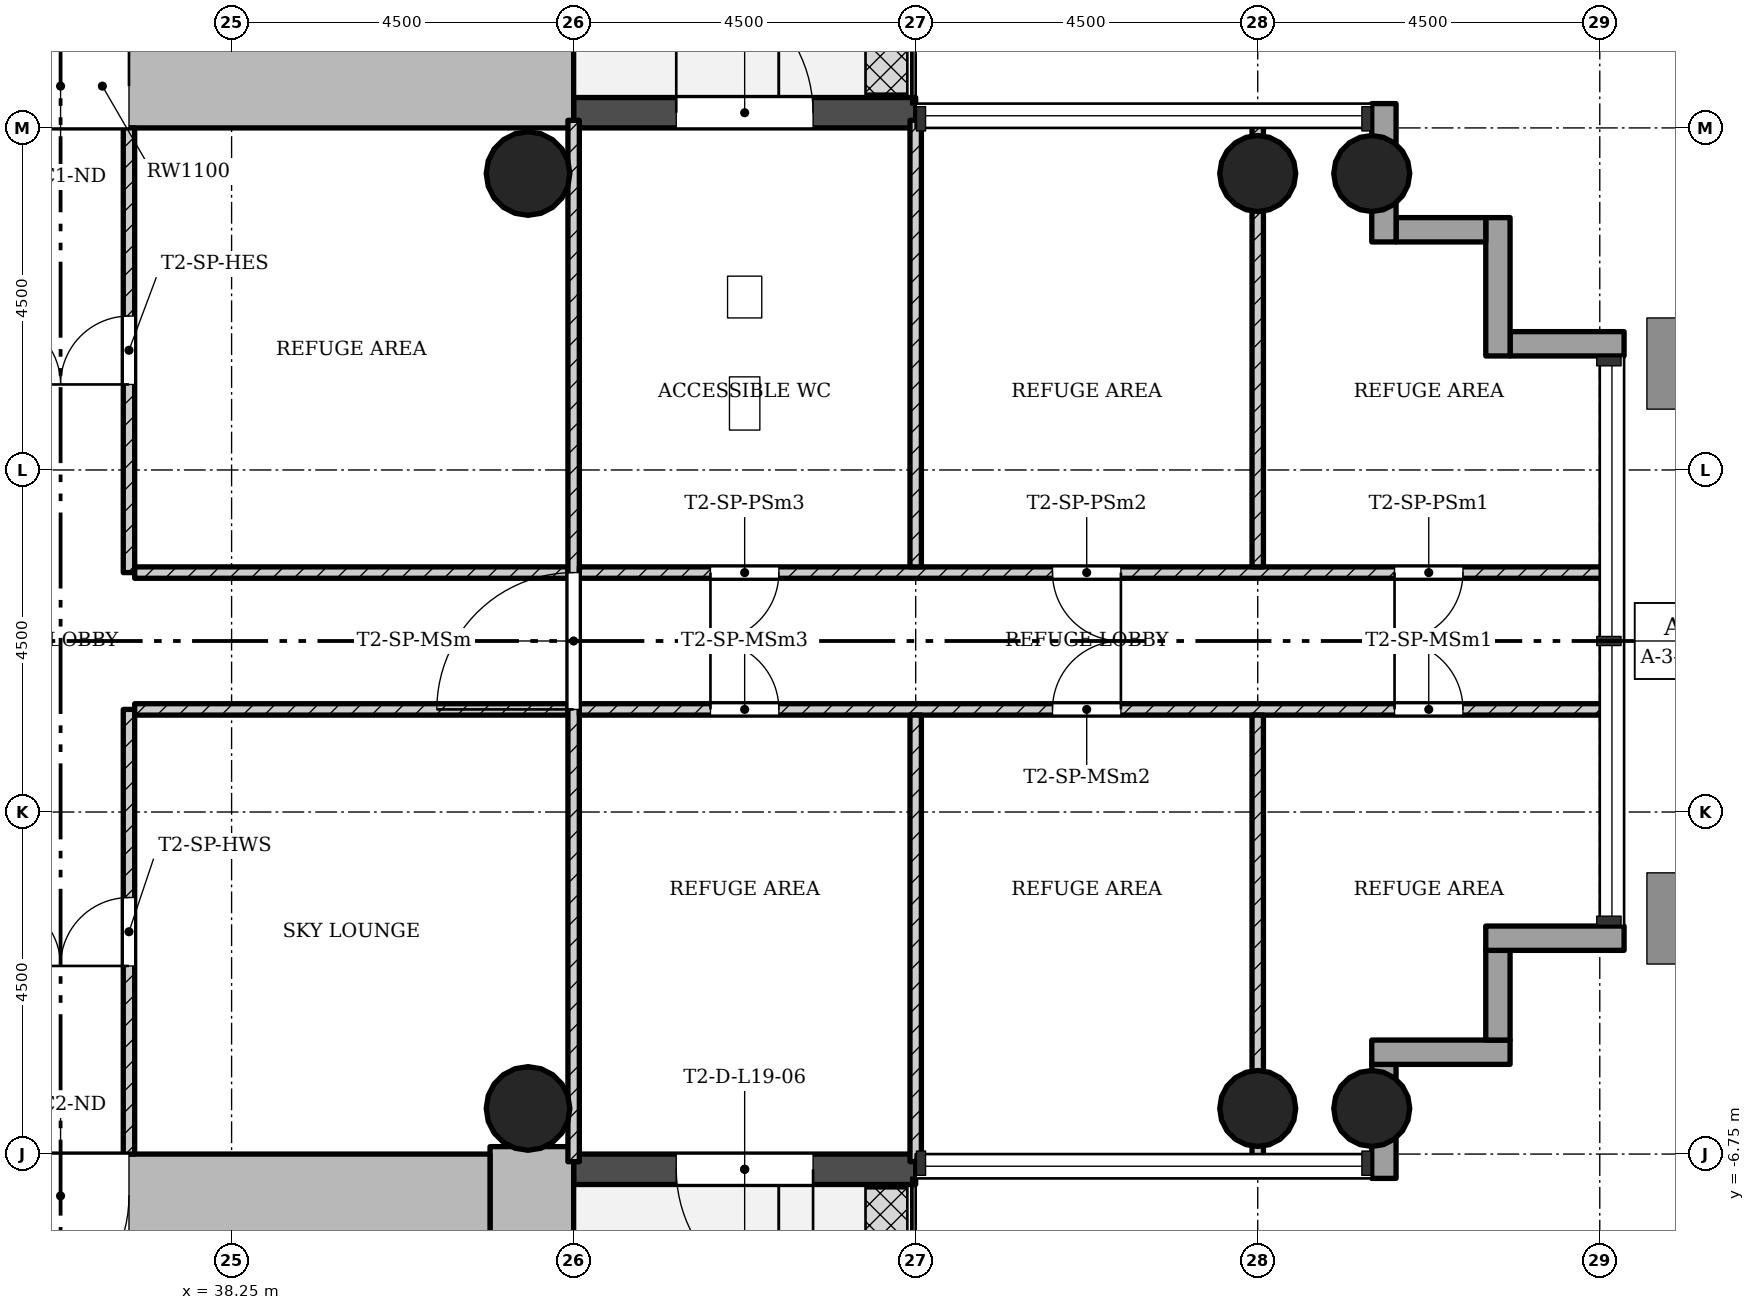
"""IFC4 building model, lengths in metres.
Left out: names, types, materials, properties, quantities, classifications, styles, units other than length and angle.
Written with IfcOpenShell. Run it as: python <this file> out.ifc"""

import sys

from ifc_helpers import new_model, si_unit, direction, frame, frame_2d, origin, origin_2d, place, context, subcontext, project, spatial, rectangle, hollow_circle, extrude, element, fill, save


model = new_model("IFC4")
c1 = context("Model", 3, precision=1e-05, world=origin(), true_north=direction((0.0, 1.0)))
c2 = subcontext(c1, "Body", "Model", "MODEL_VIEW")
j1 = project(units=[si_unit("LENGTHUNIT", "METRE"), si_unit("PLANEANGLEUNIT", "RADIAN")], contexts=[c1])
p1 = place(None, origin())
s1 = spatial("IfcSite", under=j1, at=p1, CompositionType="ELEMENT")
p2 = place(p1, origin())
s2 = spatial("IfcBuilding", under=s1, at=p2, CompositionType="ELEMENT")
p3 = place(p2, frame((0.0, 0.0, 72.1)))
s3 = spatial("IfcBuildingStorey", under=s2, at=p3, CompositionType="ELEMENT", Elevation=72.1)
p4 = place(p3, frame((30.35, 7.3, 0.0), z_axis=(0.0, 0.0, 1.0), x_axis=(1.0, 0.0, 0.0)))
e1 = element("IfcWall", 1, at=p4, inside=s3, PredefinedType="SHEAR", context=c2, shape_type="SweptSolid", body=[
    extrude(rectangle(XDim=12.4, YDim=1.1, at=frame_2d((6.2, 0.0))), origin(), (0.0, 0.0, 1.0), 4.5),
])
p5 = place(p4, frame((4.75, 0.0, 0.0)))
e2 = element("IfcOpeningElement", 2, at=p5, cuts=e1, PredefinedType="OPENING", context=c2, shape_type="SweptSolid", body=[
    extrude(rectangle(XDim=1.8, YDim=2.1, at=frame_2d((0.9, 1.05))), frame((0.0, 0.56, 0.0), z_axis=(0.0, -1.0, 0.0), x_axis=(1.0, 0.0, 0.0)), (0.0, 0.0, 1.0), 1.12),
])
p6 = place(p3, frame((42.2, -15.248, 0.0), z_axis=(0.0, 0.0, 1.0), x_axis=(0.0, 1.0, 0.0)))
e3 = element("IfcWall", 3, at=p6, inside=s3, PredefinedType="SHEAR", context=c2, shape_type="SweptSolid", body=[
    extrude(rectangle(XDim=8.596, YDim=1.1, at=frame_2d((4.298, 0.0))), origin(), (0.0, 0.0, 1.0), 4.5),
])
p7 = place(p3, frame((41.65, -7.3, 0.0), z_axis=(0.0, 0.0, 1.0), x_axis=(-1.0, 0.0, 0.0)))
e4 = element("IfcWall", 4, at=p7, inside=s3, PredefinedType="SHEAR", context=c2, shape_type="SweptSolid", body=[
    extrude(rectangle(XDim=12.4, YDim=1.1, at=frame_2d((6.2, 0.0))), origin(), (0.0, 0.0, 1.0), 4.5),
])
p8 = place(p7, frame((4.75, 0.0, 0.0)))
e5 = element("IfcOpeningElement", 5, at=p8, cuts=e4, PredefinedType="OPENING", context=c2, shape_type="SweptSolid", body=[
    extrude(rectangle(XDim=1.8, YDim=2.1, at=frame_2d((0.9, 1.05))), frame((0.0, 0.56, 0.0), z_axis=(0.0, -1.0, 0.0), x_axis=(1.0, 0.0, 0.0)), (0.0, 0.0, 1.0), 1.12),
])
for number, where, z_axis, x_axis in (
    (6, (51.75, -6.15, 0.0), (0.0, 0.0, 1.0), (1.0, 0.0, 0.0)),
    (7, (51.75, 6.15, 0.0), (0.0, 0.0, 1.0), (1.0, 0.0, 0.0)),
    (8, (53.25, -6.15, 0.0), (0.0, 0.0, 1.0), (1.0, 0.0, 0.0)),
    (9, (53.25, 6.15, 0.0), (0.0, 0.0, 1.0), (1.0, 0.0, 0.0)),
):
    element("IfcColumn", number, at=place(p3, frame(where, z_axis=z_axis, x_axis=x_axis)), inside=s3, PredefinedType="COLUMN", context=c2, shape_type="SweptSolid", body=[
        extrude(hollow_circle(Radius=0.5, WallThickness=0.036, at=origin_2d()), origin(), (0.0, 0.0, 1.0), 4.5),
    ])
for number, where, z_axis, x_axis in (
    (10, (42.15, -6.15, 0.0), (0.0, 0.0, 1.0), (1.0, 0.0, 0.0)),
    (11, (42.15, 6.15, 0.0), (0.0, 0.0, 1.0), (1.0, 0.0, 0.0)),
):
    element("IfcColumn", number, at=place(p3, frame(where, z_axis=z_axis, x_axis=x_axis)), inside=s3, PredefinedType="COLUMN", context=c2, shape_type="SweptSolid", body=[
        extrude(hollow_circle(Radius=0.55, WallThickness=0.04, at=origin_2d()), origin(), (0.0, 0.0, 1.0), 4.5),
    ])
p9 = place(p3, frame((42.75, -6.95, -0.02), z_axis=(0.0, 0.0, 1.0), x_axis=(1.0, 0.0, 0.0)))
e12 = element("IfcWall", 12, at=p9, inside=s3, PredefinedType="STANDARD", context=c2, shape_type="SweptSolid", body=[
    extrude(rectangle(XDim=4.5, YDim=0.4, at=frame_2d((2.25, 0.0))), origin(), (0.0, 0.0, 1.0), 4.22),
])
p10 = place(p9, frame((1.35, 0.0, 0.02)))
e13 = element("IfcOpeningElement", 13, at=p10, cuts=e12, PredefinedType="OPENING", context=c2, shape_type="SweptSolid", body=[
    extrude(rectangle(XDim=1.8, YDim=2.1, at=frame_2d((0.9, 1.05))), frame((0.0, 0.21, 0.0), z_axis=(0.0, -1.0, 0.0), x_axis=(1.0, 0.0, 0.0)), (0.0, 0.0, 1.0), 0.42),
])
p11 = place(p3, frame((53.41, -7.07, -0.3), z_axis=(0.0, 0.0, 1.0), x_axis=(0.0, 1.0, 0.0)))
e14 = element("IfcWall", 14, at=p11, inside=s3, PredefinedType="STANDARD", context=c2, shape_type="SweptSolid", body=[
    extrude(rectangle(XDim=1.5, YDim=0.32, at=frame_2d((0.75, 0.0))), origin(), (0.0, 0.0, 1.0), 4.5),
])
p12 = place(p3, frame((53.25, -5.41, -0.3), z_axis=(0.0, 0.0, 1.0), x_axis=(1.0, 0.0, 0.0)))
e15 = element("IfcWall", 15, at=p12, inside=s3, PredefinedType="STANDARD", context=c2, shape_type="SweptSolid", body=[
    extrude(rectangle(XDim=1.82, YDim=0.32, at=frame_2d((0.91, 0.0))), origin(), (0.0, 0.0, 1.0), 4.5),
])
p13 = place(p3, frame((54.91, -5.25, -0.3), z_axis=(0.0, 0.0, 1.0), x_axis=(0.0, 1.0, 0.0)))
e16 = element("IfcWall", 16, at=p13, inside=s3, PredefinedType="STANDARD", context=c2, shape_type="SweptSolid", body=[
    extrude(rectangle(XDim=1.18, YDim=0.32, at=frame_2d((0.59, 0.0))), origin(), (0.0, 0.0, 1.0), 4.5),
])
p14 = place(p3, frame((54.75, -3.91, -0.3), z_axis=(0.0, 0.0, 1.0), x_axis=(1.0, 0.0, 0.0)))
e17 = element("IfcWall", 17, at=p14, inside=s3, PredefinedType="STANDARD", context=c2, shape_type="SweptSolid", body=[
    extrude(rectangle(XDim=1.82, YDim=0.32, at=frame_2d((0.91, 0.0))), origin(), (0.0, 0.0, 1.0), 4.5),
])
p15 = place(p3, frame((56.57, 3.91, -0.3), z_axis=(0.0, 0.0, 1.0), x_axis=(-1.0, 0.0, 0.0)))
e18 = element("IfcWall", 18, at=p15, inside=s3, PredefinedType="STANDARD", context=c2, shape_type="SweptSolid", body=[
    extrude(rectangle(XDim=1.5, YDim=0.32, at=frame_2d((0.75, 0.0))), origin(), (0.0, 0.0, 1.0), 4.5),
])
p16 = place(p3, frame((54.91, 3.75, -0.3), z_axis=(0.0, 0.0, 1.0), x_axis=(0.0, 1.0, 0.0)))
e19 = element("IfcWall", 19, at=p16, inside=s3, PredefinedType="STANDARD", context=c2, shape_type="SweptSolid", body=[
    extrude(rectangle(XDim=1.82, YDim=0.32, at=frame_2d((0.91, 0.0))), origin(), (0.0, 0.0, 1.0), 4.5),
])
p17 = place(p3, frame((54.75, 5.41, -0.3), z_axis=(0.0, 0.0, 1.0), x_axis=(-1.0, 0.0, 0.0)))
e20 = element("IfcWall", 20, at=p17, inside=s3, PredefinedType="STANDARD", context=c2, shape_type="SweptSolid", body=[
    extrude(rectangle(XDim=1.18, YDim=0.32, at=frame_2d((0.59, 0.0))), origin(), (0.0, 0.0, 1.0), 4.5),
])
p18 = place(p3, frame((53.41, 5.25, -0.3), z_axis=(0.0, 0.0, 1.0), x_axis=(0.0, 1.0, 0.0)))
e21 = element("IfcWall", 21, at=p18, inside=s3, PredefinedType="STANDARD", context=c2, shape_type="SweptSolid", body=[
    extrude(rectangle(XDim=1.82, YDim=0.32, at=frame_2d((0.91, 0.0))), origin(), (0.0, 0.0, 1.0), 4.5),
])
p19 = place(p3, frame((47.25, 6.95, -0.02), z_axis=(0.0, 0.0, 1.0), x_axis=(-1.0, 0.0, 0.0)))
e22 = element("IfcWall", 22, at=p19, inside=s3, PredefinedType="STANDARD", context=c2, shape_type="SweptSolid", body=[
    extrude(rectangle(XDim=4.5, YDim=0.4, at=frame_2d((2.25, 0.0))), origin(), (0.0, 0.0, 1.0), 4.22),
])
p20 = place(p19, frame((1.35, 0.0, 0.02)))
e23 = element("IfcOpeningElement", 23, at=p20, cuts=e22, PredefinedType="OPENING", context=c2, shape_type="SweptSolid", body=[
    extrude(rectangle(XDim=1.8, YDim=2.1, at=frame_2d((0.9, 1.05))), frame((0.0, 0.21, 0.0), z_axis=(0.0, -1.0, 0.0), x_axis=(1.0, 0.0, 0.0)), (0.0, 0.0, 1.0), 0.42),
])
p21 = place(p3, frame((36.9, 0.9, 0.0), z_axis=(0.0, 0.0, 1.0), x_axis=(0.0, 1.0, 0.0)))
e24 = element("IfcWall", 24, at=p21, inside=s3, PredefinedType="PARTITIONING", context=c2, shape_type="SweptSolid", body=[
    extrude(rectangle(XDim=5.85, YDim=0.15, at=frame_2d((2.925, 0.0))), origin(), (0.0, 0.0, 1.0), 4.08),
])
p22 = place(p21, frame((2.475, 0.0, 0.0)))
e25 = element("IfcOpeningElement", 25, at=p22, cuts=e24, PredefinedType="OPENING", context=c2, shape_type="SweptSolid", body=[
    extrude(rectangle(XDim=0.9, YDim=2.1, at=frame_2d((0.45, 1.05))), frame((0.0, 0.085, 0.0), z_axis=(0.0, -1.0, 0.0), x_axis=(1.0, 0.0, 0.0)), (0.0, 0.0, 1.0), 0.17),
])
p23 = place(p3, frame((42.675, 0.9, 0.0), z_axis=(0.0, 0.0, 1.0), x_axis=(-1.0, 0.0, 0.0)))
e26 = element("IfcWall", 26, at=p23, inside=s3, PredefinedType="PARTITIONING", context=c2, shape_type="SweptSolid", body=[
    extrude(rectangle(XDim=5.7, YDim=0.15, at=frame_2d((2.85, 0.0))), origin(), (0.0, 0.0, 1.0), 4.08),
])
p24 = place(p3, frame((36.9, -6.75, 0.0), z_axis=(0.0, 0.0, 1.0), x_axis=(0.0, 1.0, 0.0)))
e27 = element("IfcWall", 27, at=p24, inside=s3, PredefinedType="PARTITIONING", context=c2, shape_type="SweptSolid", body=[
    extrude(rectangle(XDim=5.85, YDim=0.15, at=frame_2d((2.925, 0.0))), origin(), (0.0, 0.0, 1.0), 4.08),
])
p25 = place(p24, frame((2.475, 0.0, 0.0)))
e28 = element("IfcOpeningElement", 28, at=p25, cuts=e27, PredefinedType="OPENING", context=c2, shape_type="SweptSolid", body=[
    extrude(rectangle(XDim=0.9, YDim=2.1, at=frame_2d((0.45, 1.05))), frame((0.0, 0.085, 0.0), z_axis=(0.0, -1.0, 0.0), x_axis=(1.0, 0.0, 0.0)), (0.0, 0.0, 1.0), 0.17),
])
p26 = place(p3, frame((42.675, -0.9, 0.0), z_axis=(0.0, 0.0, 1.0), x_axis=(-1.0, 0.0, 0.0)))
e29 = element("IfcWall", 29, at=p26, inside=s3, PredefinedType="PARTITIONING", context=c2, shape_type="SweptSolid", body=[
    extrude(rectangle(XDim=5.7, YDim=0.15, at=frame_2d((2.85, 0.0))), origin(), (0.0, 0.0, 1.0), 4.08),
])
p27 = place(p3, frame((42.75, -6.85, 0.0), z_axis=(0.0, 0.0, 1.0), x_axis=(0.0, 1.0, 0.0)))
e30 = element("IfcWall", 30, at=p27, inside=s3, PredefinedType="PARTITIONING", context=c2, shape_type="SweptSolid", body=[
    extrude(rectangle(XDim=13.7, YDim=0.15, at=frame_2d((6.85, 0.0))), origin(), (0.0, 0.0, 1.0), 4.08),
])
p28 = place(p27, frame((5.95, 0.0, 0.0)))
e31 = element("IfcOpeningElement", 31, at=p28, cuts=e30, PredefinedType="OPENING", context=c2, shape_type="SweptSolid", body=[
    extrude(rectangle(XDim=1.8, YDim=2.1, at=frame_2d((0.9, 1.05))), frame((0.0, 0.085, 0.0), z_axis=(0.0, -1.0, 0.0), x_axis=(1.0, 0.0, 0.0)), (0.0, 0.0, 1.0), 0.17),
])
p29 = place(p3, frame((56.35, 0.9, 0.0), z_axis=(0.0, 0.0, 1.0), x_axis=(-1.0, 0.0, 0.0)))
e32 = element("IfcWall", 32, at=p29, inside=s3, PredefinedType="PARTITIONING", context=c2, shape_type="SweptSolid", body=[
    extrude(rectangle(XDim=13.525, YDim=0.15, at=frame_2d((6.763, 0.0))), origin(), (0.0, 0.0, 1.0), 4.08),
])
p30 = place(p29, frame((1.9, 0.0, 0.0)))
e33 = element("IfcOpeningElement", 33, at=p30, cuts=e32, PredefinedType="OPENING", context=c2, shape_type="SweptSolid", body=[
    extrude(rectangle(XDim=0.9, YDim=2.1, at=frame_2d((0.45, 1.05))), frame((0.0, 0.085, 0.0), z_axis=(0.0, -1.0, 0.0), x_axis=(1.0, 0.0, 0.0)), (0.0, 0.0, 1.0), 0.17),
])
p31 = place(p29, frame((6.4, 0.0, 0.0)))
e34 = element("IfcOpeningElement", 34, at=p31, cuts=e32, PredefinedType="OPENING", context=c2, shape_type="SweptSolid", body=[
    extrude(rectangle(XDim=0.9, YDim=2.1, at=frame_2d((0.45, 1.05))), frame((0.0, 0.085, 0.0), z_axis=(0.0, -1.0, 0.0), x_axis=(1.0, 0.0, 0.0)), (0.0, 0.0, 1.0), 0.17),
])
p32 = place(p29, frame((10.9, 0.0, 0.0)))
e35 = element("IfcOpeningElement", 35, at=p32, cuts=e32, PredefinedType="OPENING", context=c2, shape_type="SweptSolid", body=[
    extrude(rectangle(XDim=0.9, YDim=2.1, at=frame_2d((0.45, 1.05))), frame((0.0, 0.085, 0.0), z_axis=(0.0, -1.0, 0.0), x_axis=(1.0, 0.0, 0.0)), (0.0, 0.0, 1.0), 0.17),
])
for number, where, z_axis, x_axis in (
    (36, (51.75, 0.975, 0.0), (0.0, 0.0, 1.0), (0.0, 1.0, 0.0)),
    (37, (47.25, 0.975, 0.0), (0.0, 0.0, 1.0), (0.0, 1.0, 0.0)),
):
    element("IfcWall", number, at=place(p3, frame(where, z_axis=z_axis, x_axis=x_axis)), inside=s3, PredefinedType="PARTITIONING", context=c2, shape_type="SweptSolid", body=[
        extrude(rectangle(XDim=5.875, YDim=0.15, at=frame_2d((2.938, 0.0))), origin(), (0.0, 0.0, 1.0), 4.08),
    ])
p33 = place(p3, frame((56.35, -0.9, 0.0), z_axis=(0.0, 0.0, 1.0), x_axis=(-1.0, 0.0, 0.0)))
e38 = element("IfcWall", 38, at=p33, inside=s3, PredefinedType="PARTITIONING", context=c2, shape_type="SweptSolid", body=[
    extrude(rectangle(XDim=13.525, YDim=0.15, at=frame_2d((6.763, 0.0))), origin(), (0.0, 0.0, 1.0), 4.08),
])
p34 = place(p33, frame((1.9, 0.0, 0.0)))
e39 = element("IfcOpeningElement", 39, at=p34, cuts=e38, PredefinedType="OPENING", context=c2, shape_type="SweptSolid", body=[
    extrude(rectangle(XDim=0.9, YDim=2.1, at=frame_2d((0.45, 1.05))), frame((0.0, 0.085, 0.0), z_axis=(0.0, -1.0, 0.0), x_axis=(1.0, 0.0, 0.0)), (0.0, 0.0, 1.0), 0.17),
])
p35 = place(p33, frame((6.4, 0.0, 0.0)))
e40 = element("IfcOpeningElement", 40, at=p35, cuts=e38, PredefinedType="OPENING", context=c2, shape_type="SweptSolid", body=[
    extrude(rectangle(XDim=0.9, YDim=2.1, at=frame_2d((0.45, 1.05))), frame((0.0, 0.085, 0.0), z_axis=(0.0, -1.0, 0.0), x_axis=(1.0, 0.0, 0.0)), (0.0, 0.0, 1.0), 0.17),
])
p36 = place(p33, frame((10.9, 0.0, 0.0)))
e41 = element("IfcOpeningElement", 41, at=p36, cuts=e38, PredefinedType="OPENING", context=c2, shape_type="SweptSolid", body=[
    extrude(rectangle(XDim=0.9, YDim=2.1, at=frame_2d((0.45, 1.05))), frame((0.0, 0.085, 0.0), z_axis=(0.0, -1.0, 0.0), x_axis=(1.0, 0.0, 0.0)), (0.0, 0.0, 1.0), 0.17),
])
for number, where, z_axis, x_axis in (
    (42, (51.75, -0.975, 0.0), (0.0, 0.0, 1.0), (0.0, -1.0, 0.0)),
    (43, (47.25, -0.975, 0.0), (0.0, 0.0, 1.0), (0.0, -1.0, 0.0)),
):
    element("IfcWall", number, at=place(p3, frame(where, z_axis=z_axis, x_axis=x_axis)), inside=s3, PredefinedType="PARTITIONING", context=c2, shape_type="SweptSolid", body=[
        extrude(rectangle(XDim=5.875, YDim=0.15, at=frame_2d((2.938, 0.0))), origin(), (0.0, 0.0, 1.0), 4.08),
    ])
p37 = place(p10, origin())
e44 = element("IfcDoor", 44, at=p37, inside=s3, OperationType="SINGLE_SWING_RIGHT", PredefinedType="DOOR", context=c2, shape_type="SweptSolid", body=[
    extrude(rectangle(XDim=1.8, YDim=2.1, at=frame_2d((0.9, 1.05))), frame((0.0, 0.025, 0.0), z_axis=(0.0, -1.0, 0.0), x_axis=(1.0, 0.0, 0.0)), (0.0, 0.0, 1.0), 0.05),
])
fill(e13, e44)
p38 = place(p20, origin())
e45 = element("IfcDoor", 45, at=p38, inside=s3, OperationType="SINGLE_SWING_RIGHT", PredefinedType="DOOR", context=c2, shape_type="SweptSolid", body=[
    extrude(rectangle(XDim=1.8, YDim=2.1, at=frame_2d((0.9, 1.05))), frame((0.0, 0.025, 0.0), z_axis=(0.0, -1.0, 0.0), x_axis=(1.0, 0.0, 0.0)), (0.0, 0.0, 1.0), 0.05),
])
fill(e23, e45)
p39 = place(p22, origin())
e46 = element("IfcDoor", 46, at=p39, inside=s3, OperationType="SINGLE_SWING_RIGHT", PredefinedType="DOOR", context=c2, shape_type="SweptSolid", body=[
    extrude(rectangle(XDim=0.9, YDim=2.1, at=frame_2d((0.45, 1.05))), frame((0.0, 0.025, 0.0), z_axis=(0.0, -1.0, 0.0), x_axis=(1.0, 0.0, 0.0)), (0.0, 0.0, 1.0), 0.05),
])
fill(e25, e46)
p40 = place(p25, origin())
e47 = element("IfcDoor", 47, at=p40, inside=s3, OperationType="SINGLE_SWING_RIGHT", PredefinedType="DOOR", context=c2, shape_type="SweptSolid", body=[
    extrude(rectangle(XDim=0.9, YDim=2.1, at=frame_2d((0.45, 1.05))), frame((0.0, 0.025, 0.0), z_axis=(0.0, -1.0, 0.0), x_axis=(1.0, 0.0, 0.0)), (0.0, 0.0, 1.0), 0.05),
])
fill(e28, e47)
p41 = place(p28, origin())
e48 = element("IfcDoor", 48, at=p41, inside=s3, OperationType="SINGLE_SWING_RIGHT", PredefinedType="DOOR", context=c2, shape_type="SweptSolid", body=[
    extrude(rectangle(XDim=1.8, YDim=2.1, at=frame_2d((0.9, 1.05))), frame((0.0, 0.025, 0.0), z_axis=(0.0, -1.0, 0.0), x_axis=(1.0, 0.0, 0.0)), (0.0, 0.0, 1.0), 0.05),
])
fill(e31, e48)
p42 = place(p30, origin())
e49 = element("IfcDoor", 49, at=p42, inside=s3, OperationType="SINGLE_SWING_LEFT", PredefinedType="DOOR", context=c2, shape_type="SweptSolid", body=[
    extrude(rectangle(XDim=0.9, YDim=2.1, at=frame_2d((0.45, 1.05))), frame((0.0, 0.025, 0.0), z_axis=(0.0, -1.0, 0.0), x_axis=(1.0, 0.0, 0.0)), (0.0, 0.0, 1.0), 0.05),
])
fill(e33, e49)
p43 = place(p31, origin())
e50 = element("IfcDoor", 50, at=p43, inside=s3, OperationType="SINGLE_SWING_RIGHT", PredefinedType="DOOR", context=c2, shape_type="SweptSolid", body=[
    extrude(rectangle(XDim=0.9, YDim=2.1, at=frame_2d((0.45, 1.05))), frame((0.0, 0.025, 0.0), z_axis=(0.0, -1.0, 0.0), x_axis=(1.0, 0.0, 0.0)), (0.0, 0.0, 1.0), 0.05),
])
fill(e34, e50)
p44 = place(p32, origin())
e51 = element("IfcDoor", 51, at=p44, inside=s3, OperationType="SINGLE_SWING_LEFT", PredefinedType="DOOR", context=c2, shape_type="SweptSolid", body=[
    extrude(rectangle(XDim=0.9, YDim=2.1, at=frame_2d((0.45, 1.05))), frame((0.0, 0.025, 0.0), z_axis=(0.0, -1.0, 0.0), x_axis=(1.0, 0.0, 0.0)), (0.0, 0.0, 1.0), 0.05),
])
fill(e35, e51)
p45 = place(p34, origin())
e52 = element("IfcDoor", 52, at=p45, inside=s3, OperationType="SINGLE_SWING_RIGHT", PredefinedType="DOOR", context=c2, shape_type="SweptSolid", body=[
    extrude(rectangle(XDim=0.9, YDim=2.1, at=frame_2d((0.45, 1.05))), frame((0.0, 0.025, 0.0), z_axis=(0.0, -1.0, 0.0), x_axis=(1.0, 0.0, 0.0)), (0.0, 0.0, 1.0), 0.05),
])
fill(e39, e52)
p46 = place(p35, origin())
e53 = element("IfcDoor", 53, at=p46, inside=s3, OperationType="SINGLE_SWING_LEFT", PredefinedType="DOOR", context=c2, shape_type="SweptSolid", body=[
    extrude(rectangle(XDim=0.9, YDim=2.1, at=frame_2d((0.45, 1.05))), frame((0.0, 0.025, 0.0), z_axis=(0.0, -1.0, 0.0), x_axis=(1.0, 0.0, 0.0)), (0.0, 0.0, 1.0), 0.05),
])
fill(e40, e53)
p47 = place(p36, origin())
e54 = element("IfcDoor", 54, at=p47, inside=s3, OperationType="SINGLE_SWING_RIGHT", PredefinedType="DOOR", context=c2, shape_type="SweptSolid", body=[
    extrude(rectangle(XDim=0.9, YDim=2.1, at=frame_2d((0.45, 1.05))), frame((0.0, 0.025, 0.0), z_axis=(0.0, -1.0, 0.0), x_axis=(1.0, 0.0, 0.0)), (0.0, 0.0, 1.0), 0.05),
])
fill(e41, e54)
p48 = place(p5, origin())
e55 = element("IfcDoor", 55, at=p48, inside=s3, OperationType="SINGLE_SWING_LEFT", PredefinedType="DOOR", context=c2, shape_type="SweptSolid", body=[
    extrude(rectangle(XDim=1.8, YDim=2.1, at=frame_2d((0.9, 1.05))), frame((0.0, 0.025, 0.0), z_axis=(0.0, -1.0, 0.0), x_axis=(1.0, 0.0, 0.0)), (0.0, 0.0, 1.0), 0.05),
])
fill(e2, e55)
p49 = place(p8, origin())
e56 = element("IfcDoor", 56, at=p49, inside=s3, OperationType="SINGLE_SWING_LEFT", PredefinedType="DOOR", context=c2, shape_type="SweptSolid", body=[
    extrude(rectangle(XDim=1.8, YDim=2.1, at=frame_2d((0.9, 1.05))), frame((0.0, 0.025, 0.0), z_axis=(0.0, -1.0, 0.0), x_axis=(1.0, 0.0, 0.0)), (0.0, 0.0, 1.0), 0.05),
])
fill(e5, e56)
save(model, sys.argv[1])
